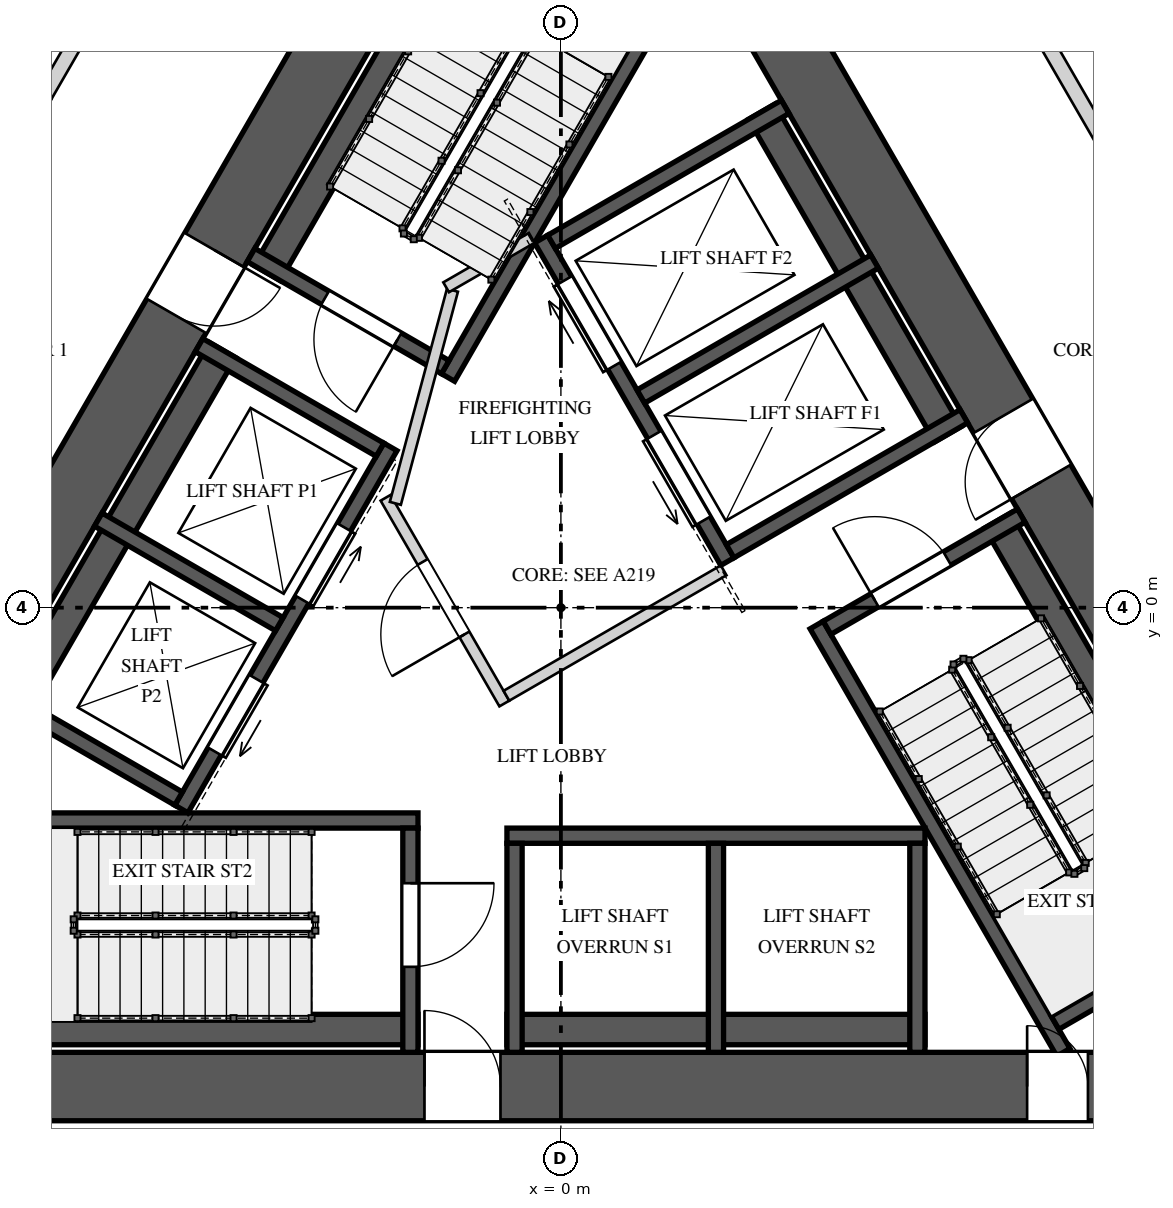
"""IFC4 building model, lengths in metres.
Left out: names, types, materials, properties, quantities, classifications, styles, units other than length and angle.
Written with IfcOpenShell. Run it as: python <this file> out.ifc"""

import sys

from ifc_helpers import new_model, si_unit, direction, frame, frame_2d, origin, place, context, subcontext, project, spatial, rectangle, extrude, element, fill, save


model = new_model("IFC4")
c1 = context("Model", 3, precision=1e-05, world=origin(), true_north=direction((0.0, 1.0)))
c2 = subcontext(c1, "Body", "Model", "MODEL_VIEW")
j1 = project(units=[si_unit("LENGTHUNIT", "METRE"), si_unit("PLANEANGLEUNIT", "RADIAN")], contexts=[c1])
p1 = place(None, origin())
s1 = spatial("IfcSite", under=j1, at=p1, CompositionType="ELEMENT")
p2 = place(p1, origin())
s2 = spatial("IfcBuilding", under=s1, at=p2, CompositionType="ELEMENT")
p3 = place(p2, frame((0.0, 0.0, 129.6)))
s3 = spatial("IfcBuildingStorey", under=s2, at=p3, CompositionType="ELEMENT", Elevation=129.6)
p4 = place(p3, frame((-1.184, 10.55, 0.0), z_axis=(0.0, 0.0, 1.0), x_axis=(-0.500004814304, -0.866022624227, 0.0)))
e1 = element("IfcWall", 1, at=p4, inside=s3, PredefinedType="SHEAR", context=c2, shape_type="SweptSolid", body=[
    extrude(rectangle(XDim=17.09, YDim=0.9, at=frame_2d((8.545, 0.0))), origin(), (0.0, 0.0, 1.0), 4.0),
])
p5 = place(p4, frame((6.75, 0.0, 0.0)))
e2 = element("IfcOpeningElement", 2, at=p5, cuts=e1, PredefinedType="OPENING", context=c2, shape_type="SweptSolid", body=[
    extrude(rectangle(XDim=1.0, YDim=2.4, at=frame_2d((0.5, 1.2))), frame((0.0, 0.46, 0.0), z_axis=(0.0, -1.0, 0.0), x_axis=(1.0, 0.0, 0.0)), (0.0, 0.0, 1.0), 0.92),
])
p6 = place(p4, frame((14.678, 0.0, 0.0)))
e3 = element("IfcOpeningElement", 3, at=p6, cuts=e1, PredefinedType="OPENING", context=c2, shape_type="SweptSolid", body=[
    extrude(rectangle(XDim=0.8, YDim=2.1, at=frame_2d((0.4, 1.05))), frame((0.0, 0.46, 0.0), z_axis=(0.0, -1.0, 0.0), x_axis=(1.0, 0.0, 0.0)), (0.0, 0.0, 1.0), 0.92),
])
p7 = place(p3, frame((-8.545, -6.3, 0.0), z_axis=(0.0, 0.0, 1.0), x_axis=(1.0, 0.0, 0.0)))
e4 = element("IfcWall", 4, at=p7, inside=s3, PredefinedType="SHEAR", context=c2, shape_type="SweptSolid", body=[
    extrude(rectangle(XDim=17.09, YDim=0.9, at=frame_2d((8.545, 0.0))), origin(), (0.0, 0.0, 1.0), 4.0),
])
p8 = place(p7, frame((6.75, 0.0, 0.0)))
e5 = element("IfcOpeningElement", 5, at=p8, cuts=e4, PredefinedType="OPENING", context=c2, shape_type="SweptSolid", body=[
    extrude(rectangle(XDim=1.0, YDim=2.4, at=frame_2d((0.5, 1.2))), frame((0.0, 0.46, 0.0), z_axis=(0.0, -1.0, 0.0), x_axis=(1.0, 0.0, 0.0)), (0.0, 0.0, 1.0), 0.92),
])
p9 = place(p7, frame((14.678, 0.0, 0.0)))
e6 = element("IfcOpeningElement", 6, at=p9, cuts=e4, PredefinedType="OPENING", context=c2, shape_type="SweptSolid", body=[
    extrude(rectangle(XDim=0.8, YDim=2.1, at=frame_2d((0.4, 1.05))), frame((0.0, 0.46, 0.0), z_axis=(0.0, -1.0, 0.0), x_axis=(1.0, 0.0, 0.0)), (0.0, 0.0, 1.0), 0.92),
])
p10 = place(p3, frame((9.729, -4.25, 0.0), z_axis=(0.0, 0.0, 1.0), x_axis=(-0.500004814304, 0.866022624227, 0.0)))
e7 = element("IfcWall", 7, at=p10, inside=s3, PredefinedType="SHEAR", context=c2, shape_type="SweptSolid", body=[
    extrude(rectangle(XDim=17.09, YDim=0.9, at=frame_2d((8.545, 0.0))), origin(), (0.0, 0.0, 1.0), 4.0),
])
p11 = place(p10, frame((6.82, 0.0, 0.0)))
e8 = element("IfcOpeningElement", 8, at=p11, cuts=e7, PredefinedType="OPENING", context=c2, shape_type="SweptSolid", body=[
    extrude(rectangle(XDim=1.0, YDim=2.4, at=frame_2d((0.5, 1.2))), frame((0.0, 0.46, 0.0), z_axis=(0.0, -1.0, 0.0), x_axis=(1.0, 0.0, 0.0)), (0.0, 0.0, 1.0), 0.92),
])
p12 = place(p3, frame((-0.766, 9.772, 0.0), z_axis=(0.0, 0.0, 1.0), x_axis=(-0.500009909098, -0.866019682689, 0.0)))
e9 = element("IfcWall", 9, at=p12, inside=s3, PredefinedType="SOLIDWALL", context=c2, shape_type="SweptSolid", body=[
    extrude(rectangle(XDim=6.2, YDim=0.4, at=frame_2d((3.1, 0.0))), origin(), (0.0, 0.0, 1.0), 3.65),
])
p13 = place(p3, frame((1.761, 8.65, 0.0), z_axis=(0.0, 0.0, 1.0), x_axis=(-0.500010023241, -0.866019616786, 0.0)))
e10 = element("IfcWall", 10, at=p13, inside=s3, PredefinedType="SOLIDWALL", context=c2, shape_type="SweptSolid", body=[
    extrude(rectangle(XDim=6.491, YDim=0.2, at=frame_2d((3.246, 0.0))), origin(), (0.0, 0.0, 1.0), 3.65),
])
p14 = place(p3, frame((-1.521, 3.165, 0.0), z_axis=(0.0, 0.0, 1.0), x_axis=(-0.866039495442, 0.49997559174, 0.0)))
e11 = element("IfcWall", 11, at=p14, inside=s3, PredefinedType="SOLIDWALL", context=c2, shape_type="SweptSolid", body=[
    extrude(rectangle(XDim=2.95, YDim=0.2, at=frame_2d((1.475, 0.0))), origin(), (0.0, 0.0, 1.0), 3.65),
])
p15 = place(p14, frame((0.725, 0.0, 0.0)))
e12 = element("IfcOpeningElement", 12, at=p15, cuts=e11, PredefinedType="OPENING", context=c2, shape_type="SweptSolid", body=[
    extrude(rectangle(XDim=1.1, YDim=2.4, at=frame_2d((0.55, 1.2))), frame((0.0, 0.11, 0.0), z_axis=(0.0, -1.0, 0.0), x_axis=(1.0, 0.0, 0.0)), (0.0, 0.0, 1.0), 0.22),
])
p16 = place(p3, frame((-8.08, -5.55, 0.0), z_axis=(0.0, 0.0, 1.0), x_axis=(1.0, 0.0, 0.0)))
e13 = element("IfcWall", 13, at=p16, inside=s3, PredefinedType="SOLIDWALL", context=c2, shape_type="SweptSolid", body=[
    extrude(rectangle(XDim=6.2, YDim=0.4, at=frame_2d((3.1, 0.0))), origin(), (0.0, 0.0, 1.0), 3.65),
])
p17 = place(p3, frame((-8.372, -2.8, 0.0), z_axis=(0.0, 0.0, 1.0), x_axis=(1.0, 0.0, 0.0)))
e14 = element("IfcWall", 14, at=p17, inside=s3, PredefinedType="SOLIDWALL", context=c2, shape_type="SweptSolid", body=[
    extrude(rectangle(XDim=6.492, YDim=0.2, at=frame_2d((3.246, 0.0))), origin(), (0.0, 0.0, 1.0), 3.65),
])
p18 = place(p3, frame((-1.98, -2.9, 0.0), z_axis=(0.0, 0.0, 1.0), x_axis=(0.0, -1.0, 0.0)))
e15 = element("IfcWall", 15, at=p18, inside=s3, PredefinedType="SOLIDWALL", context=c2, shape_type="SweptSolid", body=[
    extrude(rectangle(XDim=2.95, YDim=0.2, at=frame_2d((1.475, 0.0))), origin(), (0.0, 0.0, 1.0), 3.65),
])
p19 = place(p18, frame((0.725, 0.0, 0.0)))
e16 = element("IfcOpeningElement", 16, at=p19, cuts=e15, PredefinedType="OPENING", context=c2, shape_type="SweptSolid", body=[
    extrude(rectangle(XDim=1.1, YDim=2.4, at=frame_2d((0.55, 1.2))), frame((0.0, 0.11, 0.0), z_axis=(0.0, -1.0, 0.0), x_axis=(1.0, 0.0, 0.0)), (0.0, 0.0, 1.0), 0.22),
])
p20 = place(p3, frame((8.846, -4.222, 0.0), z_axis=(0.0, 0.0, 1.0), x_axis=(-0.500009909098, 0.866019682689, 0.0)))
e17 = element("IfcWall", 17, at=p20, inside=s3, PredefinedType="SOLIDWALL", context=c2, shape_type="SweptSolid", body=[
    extrude(rectangle(XDim=6.2, YDim=0.4, at=frame_2d((3.1, 0.0))), origin(), (0.0, 0.0, 1.0), 3.65),
])
p21 = place(p3, frame((6.611, -5.85, 0.0), z_axis=(0.0, 0.0, 1.0), x_axis=(-0.499965531574, 0.866045303225, 0.0)))
e18 = element("IfcWall", 18, at=p21, inside=s3, PredefinedType="SOLIDWALL", context=c2, shape_type="SweptSolid", body=[
    extrude(rectangle(XDim=6.492, YDim=0.2, at=frame_2d((3.246, 0.0))), origin(), (0.0, 0.0, 1.0), 3.65),
])
p22 = place(p3, frame((6.501, -5.461, 0.0), z_axis=(0.0, 0.0, 1.0), x_axis=(0.866003658127, 0.500037662692, 0.0)))
e19 = element("IfcWall", 19, at=p22, inside=s3, PredefinedType="SOLIDWALL", context=c2, shape_type="SweptSolid", body=[
    extrude(rectangle(XDim=2.95, YDim=0.2, at=frame_2d((1.475, 0.0))), origin(), (0.0, 0.0, 1.0), 3.65),
])
p23 = place(p3, frame((3.501, -0.265, 0.0), z_axis=(0.0, 0.0, 1.0), x_axis=(0.866039495442, 0.49997559174, 0.0)))
e20 = element("IfcWall", 20, at=p23, inside=s3, PredefinedType="SOLIDWALL", context=c2, shape_type="SweptSolid", body=[
    extrude(rectangle(XDim=2.95, YDim=0.2, at=frame_2d((1.475, 0.0))), origin(), (0.0, 0.0, 1.0), 3.65),
])
p24 = place(p23, frame((0.725, 0.0, 0.0)))
e21 = element("IfcOpeningElement", 21, at=p24, cuts=e20, PredefinedType="OPENING", context=c2, shape_type="SweptSolid", body=[
    extrude(rectangle(XDim=1.1, YDim=2.4, at=frame_2d((0.55, 1.2))), frame((0.0, 0.11, 0.0), z_axis=(0.0, -1.0, 0.0), x_axis=(1.0, 0.0, 0.0)), (0.0, 0.0, 1.0), 0.22),
])
p25 = place(p3, frame((-2.243, 2.115, 0.0), z_axis=(0.0, 0.0, 1.0), x_axis=(-0.499996545922, -0.866027397988, 0.0)))
e22 = element("IfcWall", 22, at=p25, inside=s3, PredefinedType="SOLIDWALL", context=c2, shape_type="SweptSolid", body=[
    extrude(rectangle(XDim=5.5, YDim=0.2, at=frame_2d((2.75, 0.0))), origin(), (0.0, 0.0, 1.0), 3.65),
])
p26 = place(p25, frame((1.22, 0.0, 0.0)))
e23 = element("IfcOpeningElement", 23, at=p26, cuts=e22, PredefinedType="OPENING", context=c2, shape_type="SweptSolid", body=[
    extrude(rectangle(XDim=1.1, YDim=2.1, at=frame_2d((0.55, 1.05))), frame((0.0, 0.11, 0.0), z_axis=(0.0, -1.0, 0.0), x_axis=(1.0, 0.0, 0.0)), (0.0, 0.0, 1.0), 0.22),
])
p27 = place(p25, frame((3.525, 0.0, 0.0)))
e24 = element("IfcOpeningElement", 24, at=p27, cuts=e22, PredefinedType="OPENING", context=c2, shape_type="SweptSolid", body=[
    extrude(rectangle(XDim=1.1, YDim=2.1, at=frame_2d((0.55, 1.05))), frame((0.0, 0.11, 0.0), z_axis=(0.0, -1.0, 0.0), x_axis=(1.0, 0.0, 0.0)), (0.0, 0.0, 1.0), 0.22),
])
p28 = place(p3, frame((-4.451, 3.39, 0.0), z_axis=(0.0, 0.0, 1.0), x_axis=(-0.499996545922, -0.866027397988, 0.0)))
e25 = element("IfcWall", 25, at=p28, inside=s3, PredefinedType="SOLIDWALL", context=c2, shape_type="SweptSolid", body=[
    extrude(rectangle(XDim=5.5, YDim=0.4, at=frame_2d((2.75, 0.0))), origin(), (0.0, 0.0, 1.0), 3.65),
])
for number, where, z_axis, x_axis in (
    (26, (-2.38, 2.078, 0.0), (0.0, 0.0, 1.0), (-0.866, 0.5, 0.0)),
    (27, (-3.705, -0.217, 0.0), (0.0, 0.0, 1.0), (-0.866, 0.5, 0.0)),
):
    element("IfcWall", number, at=place(p3, frame(where, z_axis=z_axis, x_axis=x_axis)), inside=s3, PredefinedType="SOLIDWALL", context=c2, shape_type="SweptSolid", body=[
        extrude(rectangle(XDim=2.75, YDim=0.2, at=frame_2d((1.375, 0.0))), origin(), (0.0, 0.0, 1.0), 3.65),
    ])
p29 = place(p3, frame((-5.03, -2.512, 0.0), z_axis=(0.0, 0.0, 1.0), x_axis=(-0.866005201286, 0.500034990121, 0.0)))
e28 = element("IfcWall", 28, at=p29, inside=s3, PredefinedType="SOLIDWALL", context=c2, shape_type="SweptSolid", body=[
    extrude(rectangle(XDim=2.75, YDim=0.2, at=frame_2d((1.375, 0.0))), origin(), (0.0, 0.0, 1.0), 3.65),
])
p30 = place(p3, frame((-0.71, -3.0, 0.0), z_axis=(0.0, 0.0, 1.0), x_axis=(1.0, 0.0, 0.0)))
e29 = element("IfcWall", 29, at=p30, inside=s3, PredefinedType="SOLIDWALL", context=c2, shape_type="SweptSolid", body=[
    extrude(rectangle(XDim=5.5, YDim=0.2, at=frame_2d((2.75, 0.0))), origin(), (0.0, 0.0, 1.0), 3.65),
])
p31 = place(p3, frame((-0.71, -5.55, 0.0), z_axis=(0.0, 0.0, 1.0), x_axis=(1.0, 0.0, 0.0)))
e30 = element("IfcWall", 30, at=p31, inside=s3, PredefinedType="SOLIDWALL", context=c2, shape_type="SweptSolid", body=[
    extrude(rectangle(XDim=5.5, YDim=0.4, at=frame_2d((2.75, 0.0))), origin(), (0.0, 0.0, 1.0), 3.65),
])
for number, where, z_axis, x_axis in (
    (31, (-0.61, -3.1, 0.0), (0.0, 0.0, 1.0), (0.0, -1.0, 0.0)),
    (32, (2.04, -3.1, 0.0), (0.0, 0.0, 1.0), (0.0, -1.0, 0.0)),
    (33, (4.69, -3.1, 0.0), (0.0, 0.0, 1.0), (0.0, -1.0, 0.0)),
):
    element("IfcWall", number, at=place(p3, frame(where, z_axis=z_axis, x_axis=x_axis)), inside=s3, PredefinedType="SOLIDWALL", context=c2, shape_type="SweptSolid", body=[
        extrude(rectangle(XDim=2.75, YDim=0.2, at=frame_2d((1.375, 0.0))), origin(), (0.0, 0.0, 1.0), 3.65),
    ])
p32 = place(p3, frame((2.19, 0.606, 0.0), z_axis=(0.0, 0.0, 1.0), x_axis=(-0.500002801628, 0.866023786258, 0.0)))
e34 = element("IfcWall", 34, at=p32, inside=s3, PredefinedType="SOLIDWALL", context=c2, shape_type="SweptSolid", body=[
    extrude(rectangle(XDim=4.9, YDim=0.2, at=frame_2d((2.45, 0.0))), origin(), (0.0, 0.0, 1.0), 3.65),
])
p33 = place(p32, frame((0.625, 0.0, 0.0)))
e35 = element("IfcOpeningElement", 35, at=p33, cuts=e34, PredefinedType="OPENING", context=c2, shape_type="SweptSolid", body=[
    extrude(rectangle(XDim=1.3, YDim=2.1, at=frame_2d((0.65, 1.05))), frame((0.0, 0.11, 0.0), z_axis=(0.0, -1.0, 0.0), x_axis=(1.0, 0.0, 0.0)), (0.0, 0.0, 1.0), 0.22),
])
p34 = place(p32, frame((2.975, 0.0, 0.0)))
e36 = element("IfcOpeningElement", 36, at=p34, cuts=e34, PredefinedType="OPENING", context=c2, shape_type="SweptSolid", body=[
    extrude(rectangle(XDim=1.3, YDim=2.1, at=frame_2d((0.65, 1.05))), frame((0.0, 0.11, 0.0), z_axis=(0.0, -1.0, 0.0), x_axis=(1.0, 0.0, 0.0)), (0.0, 0.0, 1.0), 0.22),
])
p35 = place(p3, frame((5.092, 2.281, 0.0), z_axis=(0.0, 0.0, 1.0), x_axis=(-0.500018594424, 0.866014668023, 0.0)))
e37 = element("IfcWall", 37, at=p35, inside=s3, PredefinedType="SOLIDWALL", context=c2, shape_type="SweptSolid", body=[
    extrude(rectangle(XDim=4.9, YDim=0.4, at=frame_2d((2.45, 0.0))), origin(), (0.0, 0.0, 1.0), 3.65),
])
for number, where, z_axis, x_axis in (
    (38, (2.227, 0.743, 0.0), (0.0, 0.0, 1.0), (0.866, 0.5, 0.0)),
    (39, (1.052, 2.778, 0.0), (0.0, 0.0, 1.0), (0.866, 0.5, 0.0)),
):
    element("IfcWall", number, at=place(p3, frame(where, z_axis=z_axis, x_axis=x_axis)), inside=s3, PredefinedType="SOLIDWALL", context=c2, shape_type="SweptSolid", body=[
        extrude(rectangle(XDim=3.55, YDim=0.2, at=frame_2d((1.775, 0.0))), origin(), (0.0, 0.0, 1.0), 3.65),
    ])
p36 = place(p3, frame((-0.123, 4.813, 0.0), z_axis=(0.0, 0.0, 1.0), x_axis=(0.865995461329, 0.500051858269, 0.0)))
e40 = element("IfcWall", 40, at=p36, inside=s3, PredefinedType="SOLIDWALL", context=c2, shape_type="SweptSolid", body=[
    extrude(rectangle(XDim=3.55, YDim=0.2, at=frame_2d((1.775, 0.0))), origin(), (0.0, 0.0, 1.0), 3.65),
])
p37 = place(p3, frame((-0.744, -1.261, 0.0), z_axis=(0.0, 0.0, 1.0), x_axis=(-0.500004234368, 0.866022959057, 0.0)))
e41 = element("IfcWall", 41, at=p37, inside=s3, PredefinedType="PARTITIONING", context=c2, shape_type="SweptSolid", body=[
    extrude(rectangle(XDim=3.125, YDim=0.15, at=frame_2d((1.562, 0.0))), origin(), (0.0, 0.0, 1.0), 3.65),
])
p38 = place(p37, frame((1.05, 0.0, 0.0)))
e42 = element("IfcOpeningElement", 42, at=p38, cuts=e41, PredefinedType="OPENING", context=c2, shape_type="SweptSolid", body=[
    extrude(rectangle(XDim=1.1, YDim=2.4, at=frame_2d((0.55, 1.2))), frame((0.0, 0.085, 0.0), z_axis=(0.0, -1.0, 0.0), x_axis=(1.0, 0.0, 0.0)), (0.0, 0.0, 1.0), 0.17),
])
p39 = place(p3, frame((-0.717, -1.159, 0.0), z_axis=(0.0, 0.0, 1.0), x_axis=(0.866008176907, 0.50002983664, 0.0)))
e43 = element("IfcWall", 43, at=p39, inside=s3, PredefinedType="PARTITIONING", context=c2, shape_type="SweptSolid", body=[
    extrude(rectangle(XDim=3.3, YDim=0.15, at=frame_2d((1.65, 0.0))), origin(), (0.0, 0.0, 1.0), 3.65),
])
p40 = place(p3, frame((-2.178, 1.372, 0.0), z_axis=(0.0, 0.0, 1.0), x_axis=(0.258808958833, 0.96592852884, 0.0)))
e44 = element("IfcWall", 44, at=p40, inside=s3, PredefinedType="PARTITIONING", context=c2, shape_type="SweptSolid", body=[
    extrude(rectangle(XDim=2.903, YDim=0.15, at=frame_2d((1.451, 0.0))), origin(), (0.0, 0.0, 1.0), 3.65),
])
p41 = place(p3, frame((-1.51, 4.215, 0.0), z_axis=(0.0, 0.0, 1.0), x_axis=(0.866085525409, 0.49989585183, 0.0)))
e45 = element("IfcWall", 45, at=p41, inside=s3, PredefinedType="PARTITIONING", context=c2, shape_type="SweptSolid", body=[
    extrude(rectangle(XDim=1.3, YDim=0.15, at=frame_2d((0.65, 0.0))), origin(), (0.0, 0.0, 1.0), 3.65),
])
p42 = place(p3, frame((6.944, 10.073, 0.0), z_axis=(0.0, 0.0, 1.0), x_axis=(0.499993726502, -0.86602902576, 0.0)))
e46 = element("IfcWall", 46, at=p42, inside=s3, PredefinedType="PARTITIONING", context=c2, shape_type="SweptSolid", body=[
    extrude(rectangle(XDim=4.7, YDim=0.15, at=frame_2d((2.35, 0.0))), origin(), (0.0, 0.0, 1.0), 3.65),
])
p43 = place(p42, frame((1.94, 0.0, 0.0)))
e47 = element("IfcOpeningElement", 47, at=p43, cuts=e46, PredefinedType="OPENING", context=c2, shape_type="SweptSolid", body=[
    extrude(rectangle(XDim=0.95, YDim=2.4, at=frame_2d((0.475, 1.2))), frame((0.0, 0.085, 0.0), z_axis=(0.0, -1.0, 0.0), x_axis=(1.0, 0.0, 0.0)), (0.0, 0.0, 1.0), 0.17),
])
p44 = place(p3, frame((5.851, 8.366, 0.0), z_axis=(0.0, 0.0, 1.0), x_axis=(0.499998034377, -0.866026538634, 0.0)))
e48 = element("IfcWall", 48, at=p44, inside=s3, PredefinedType="SOLIDWALL", context=c2, shape_type="SweptSolid", body=[
    extrude(rectangle(XDim=3.783, YDim=0.2, at=frame_2d((1.892, 0.0))), origin(), (0.0, 0.0, 1.0), 3.65),
])
p45 = place(p3, frame((-6.79, 6.739, 0.0), z_axis=(0.0, 0.0, 1.0), x_axis=(0.500118100521, 0.865957207679, 0.0)))
e49 = element("IfcWall", 49, at=p45, inside=s3, PredefinedType="SOLIDWALL", context=c2, shape_type="SweptSolid", body=[
    extrude(rectangle(XDim=0.944, YDim=0.2, at=frame_2d((0.472, 0.0))), origin(), (0.0, 0.0, 1.0), 2.55),
])
p46 = place(p15, origin())
e50 = element("IfcDoor", 50, at=p46, inside=s3, OperationType="SINGLE_SWING_RIGHT", PredefinedType="DOOR", context=c2, shape_type="SweptSolid", body=[
    extrude(rectangle(XDim=1.1, YDim=2.4, at=frame_2d((0.55, 1.2))), frame((0.0, 0.025, 0.0), z_axis=(0.0, -1.0, 0.0), x_axis=(1.0, 0.0, 0.0)), (0.0, 0.0, 1.0), 0.05),
])
fill(e12, e50)
p47 = place(p19, origin())
e51 = element("IfcDoor", 51, at=p47, inside=s3, OperationType="SINGLE_SWING_LEFT", PredefinedType="DOOR", context=c2, shape_type="SweptSolid", body=[
    extrude(rectangle(XDim=1.1, YDim=2.4, at=frame_2d((0.55, 1.2))), frame((0.0, 0.025, 0.0), z_axis=(0.0, -1.0, 0.0), x_axis=(1.0, 0.0, 0.0)), (0.0, 0.0, 1.0), 0.05),
])
fill(e16, e51)
p48 = place(p24, origin())
e52 = element("IfcDoor", 52, at=p48, inside=s3, OperationType="SINGLE_SWING_RIGHT", PredefinedType="DOOR", context=c2, shape_type="SweptSolid", body=[
    extrude(rectangle(XDim=1.1, YDim=2.4, at=frame_2d((0.55, 1.2))), frame((0.0, 0.025, 0.0), z_axis=(0.0, -1.0, 0.0), x_axis=(1.0, 0.0, 0.0)), (0.0, 0.0, 1.0), 0.05),
])
fill(e21, e52)
p49 = place(p26, origin())
e53 = element("IfcDoor", 53, at=p49, inside=s3, OperationType="SLIDING_TO_LEFT", PredefinedType="DOOR", context=c2, shape_type="SweptSolid", body=[
    extrude(rectangle(XDim=1.1, YDim=2.1, at=frame_2d((0.55, 1.05))), frame((0.0, 0.025, 0.0), z_axis=(0.0, -1.0, 0.0), x_axis=(1.0, 0.0, 0.0)), (0.0, 0.0, 1.0), 0.05),
])
fill(e23, e53)
p50 = place(p27, origin())
e54 = element("IfcDoor", 54, at=p50, inside=s3, OperationType="SLIDING_TO_RIGHT", PredefinedType="DOOR", context=c2, shape_type="SweptSolid", body=[
    extrude(rectangle(XDim=1.1, YDim=2.1, at=frame_2d((0.55, 1.05))), frame((0.0, 0.025, 0.0), z_axis=(0.0, -1.0, 0.0), x_axis=(1.0, 0.0, 0.0)), (0.0, 0.0, 1.0), 0.05),
])
fill(e24, e54)
p51 = place(p33, origin())
e55 = element("IfcDoor", 55, at=p51, inside=s3, OperationType="SLIDING_TO_LEFT", PredefinedType="DOOR", context=c2, shape_type="SweptSolid", body=[
    extrude(rectangle(XDim=1.3, YDim=2.1, at=frame_2d((0.65, 1.05))), frame((0.0, 0.025, 0.0), z_axis=(0.0, -1.0, 0.0), x_axis=(1.0, 0.0, 0.0)), (0.0, 0.0, 1.0), 0.05),
])
fill(e35, e55)
p52 = place(p34, origin())
e56 = element("IfcDoor", 56, at=p52, inside=s3, OperationType="SLIDING_TO_RIGHT", PredefinedType="DOOR", context=c2, shape_type="SweptSolid", body=[
    extrude(rectangle(XDim=1.3, YDim=2.1, at=frame_2d((0.65, 1.05))), frame((0.0, 0.025, 0.0), z_axis=(0.0, -1.0, 0.0), x_axis=(1.0, 0.0, 0.0)), (0.0, 0.0, 1.0), 0.05),
])
fill(e36, e56)
p53 = place(p38, origin())
e57 = element("IfcDoor", 57, at=p53, inside=s3, OperationType="SINGLE_SWING_LEFT", PredefinedType="DOOR", context=c2, shape_type="SweptSolid", body=[
    extrude(rectangle(XDim=1.1, YDim=2.4, at=frame_2d((0.55, 1.2))), frame((0.0, 0.025, 0.0), z_axis=(0.0, -1.0, 0.0), x_axis=(1.0, 0.0, 0.0)), (0.0, 0.0, 1.0), 0.05),
])
fill(e42, e57)
p54 = place(p5, origin())
e58 = element("IfcDoor", 58, at=p54, inside=s3, OperationType="SINGLE_SWING_RIGHT", PredefinedType="DOOR", context=c2, shape_type="SweptSolid", body=[
    extrude(rectangle(XDim=1.0, YDim=2.4, at=frame_2d((0.5, 1.2))), frame((0.0, 0.025, 0.0), z_axis=(0.0, -1.0, 0.0), x_axis=(1.0, 0.0, 0.0)), (0.0, 0.0, 1.0), 0.05),
])
fill(e2, e58)
p55 = place(p8, origin())
e59 = element("IfcDoor", 59, at=p55, inside=s3, OperationType="SINGLE_SWING_LEFT", PredefinedType="DOOR", context=c2, shape_type="SweptSolid", body=[
    extrude(rectangle(XDim=1.0, YDim=2.4, at=frame_2d((0.5, 1.2))), frame((0.0, 0.025, 0.0), z_axis=(0.0, -1.0, 0.0), x_axis=(1.0, 0.0, 0.0)), (0.0, 0.0, 1.0), 0.05),
])
fill(e5, e59)
p56 = place(p11, origin())
e60 = element("IfcDoor", 60, at=p56, inside=s3, OperationType="SINGLE_SWING_RIGHT", PredefinedType="DOOR", context=c2, shape_type="SweptSolid", body=[
    extrude(rectangle(XDim=1.0, YDim=2.4, at=frame_2d((0.5, 1.2))), frame((0.0, 0.025, 0.0), z_axis=(0.0, -1.0, 0.0), x_axis=(1.0, 0.0, 0.0)), (0.0, 0.0, 1.0), 0.05),
])
fill(e8, e60)
p57 = place(p9, origin())
e61 = element("IfcDoor", 61, at=p57, inside=s3, OperationType="SINGLE_SWING_RIGHT", PredefinedType="DOOR", context=c2, shape_type="SweptSolid", body=[
    extrude(rectangle(XDim=0.8, YDim=2.1, at=frame_2d((0.4, 1.05))), frame((0.0, 0.025, 0.0), z_axis=(0.0, -1.0, 0.0), x_axis=(1.0, 0.0, 0.0)), (0.0, 0.0, 1.0), 0.05),
])
fill(e6, e61)
save(model, sys.argv[1])
